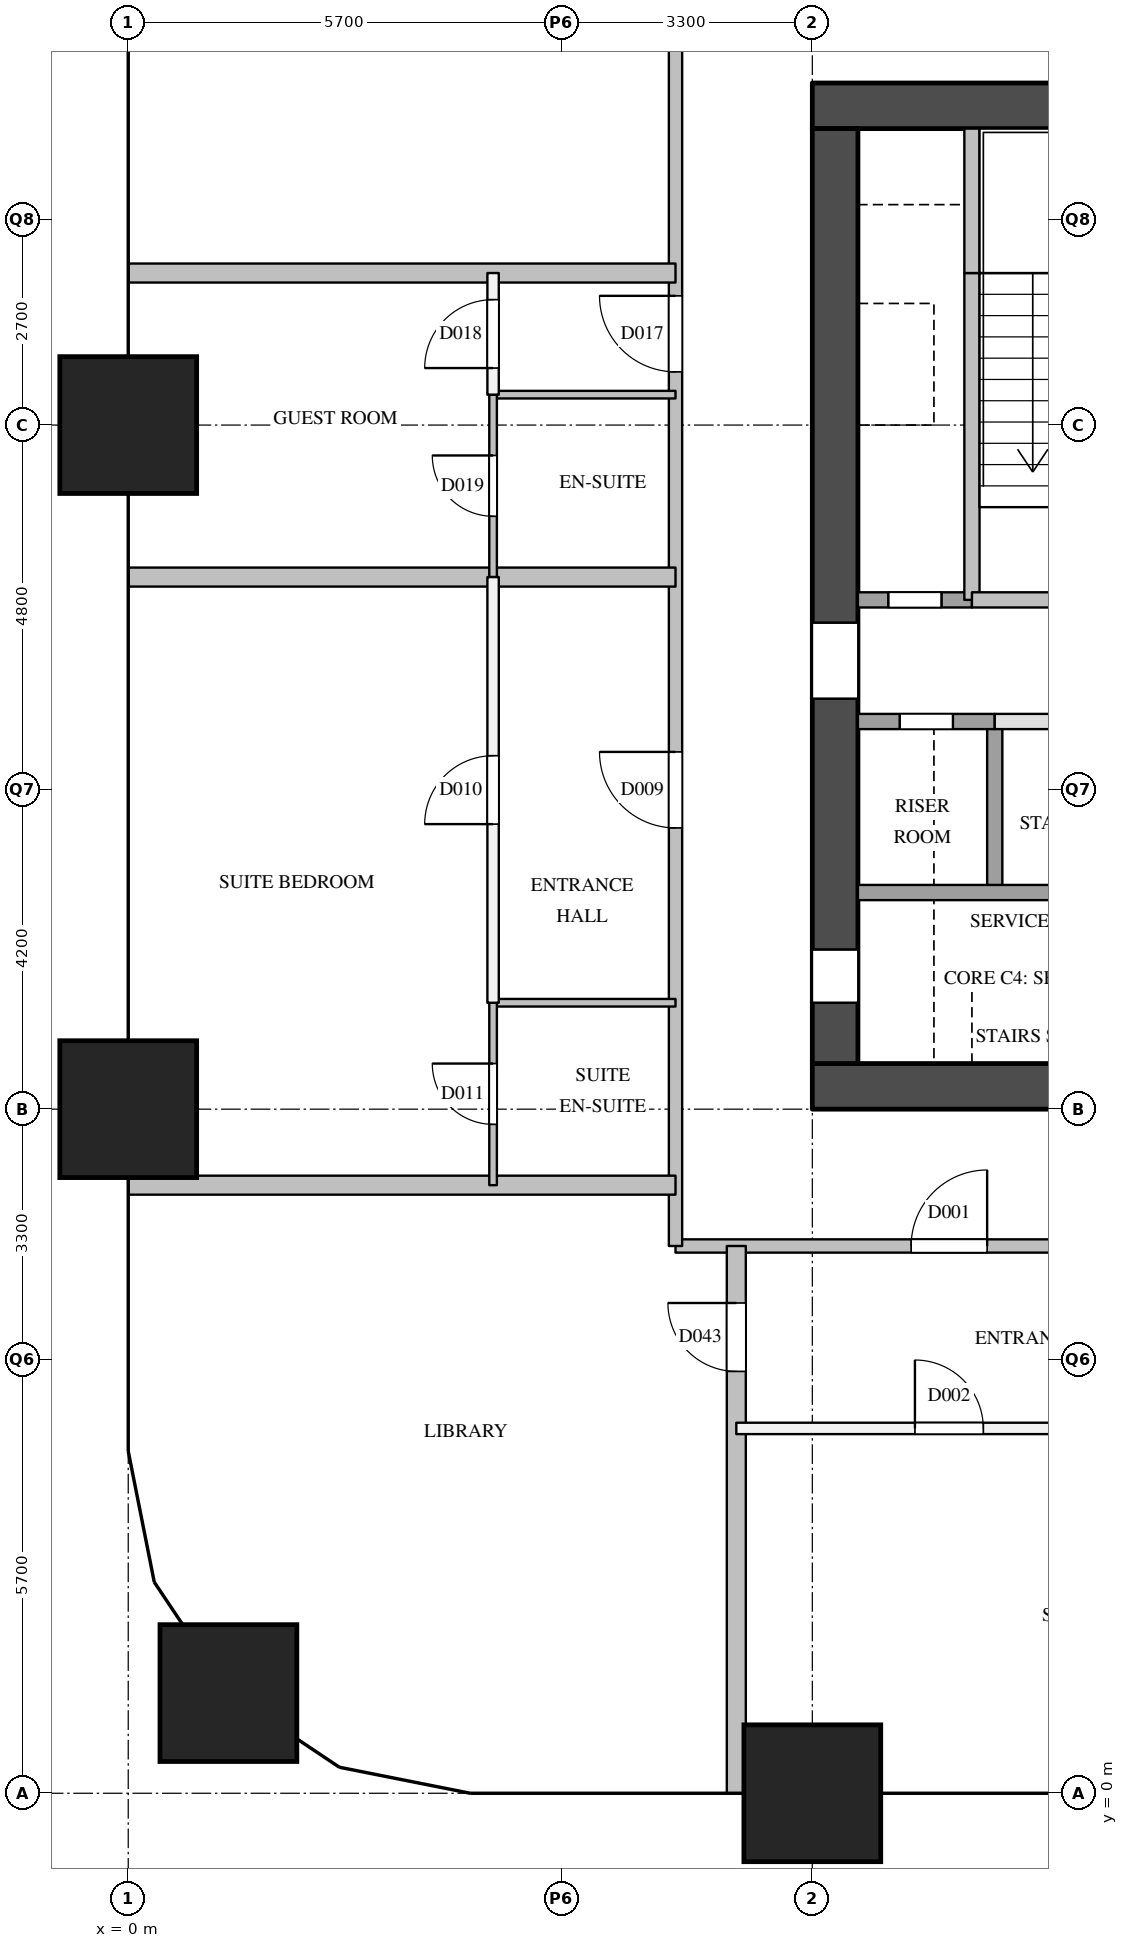
"""IFC4 building model, lengths in metres.
Left out: names, types, materials, properties, quantities, classifications, styles, units other than length and angle.
Written with IfcOpenShell. Run it as: python <this file> out.ifc"""

import sys

from ifc_helpers import new_model, si_unit, direction, frame, frame_2d, origin, origin_2d, place, context, subcontext, project, spatial, rectangle, extrude, element, fill, save


model = new_model("IFC4")
c1 = context("Model", 3, precision=1e-05, world=origin(), true_north=direction((0.0, 1.0)))
c2 = subcontext(c1, "Body", "Model", "MODEL_VIEW")
j1 = project(units=[si_unit("LENGTHUNIT", "METRE"), si_unit("PLANEANGLEUNIT", "RADIAN")], contexts=[c1])
p1 = place(None, origin())
s1 = spatial("IfcSite", under=j1, at=p1, CompositionType="ELEMENT")
p2 = place(p1, origin())
s2 = spatial("IfcBuilding", under=s1, at=p2, CompositionType="ELEMENT")
p3 = place(p2, frame((0.0, 0.0, 34.8)))
s3 = spatial("IfcBuildingStorey", under=s2, at=p3, CompositionType="ELEMENT", Elevation=34.8)
for number, where, z_axis, x_axis in (
    (1, (1.318, 1.318, 0.0), (0.0, 0.0, 1.0), (1.0, 0.0, 0.0)),
    (2, (0.0, 9.0, 0.0), (0.0, 0.0, 1.0), (1.0, 0.0, 0.0)),
    (3, (0.0, 18.0, 0.0), (0.0, 0.0, 1.0), (1.0, 0.0, 0.0)),
    (4, (9.0, 0.0, 0.0), (0.0, 0.0, 1.0), (1.0, 0.0, 0.0)),
):
    element("IfcColumn", number, at=place(p3, frame(where, z_axis=z_axis, x_axis=x_axis)), inside=s3, PredefinedType="COLUMN", context=c2, shape_type="SweptSolid", body=[
        extrude(rectangle(XDim=1.8, YDim=1.8, at=origin_2d()), origin(), (0.0, 0.0, 1.0), 3.8),
    ])
for number, where, z_axis, x_axis in (
    (5, (9.0, 9.3, 0.0), (0.0, 0.0, 1.0), (1.0, 0.0, 0.0)),
    (6, (9.0, 22.2, 0.0), (0.0, 0.0, 1.0), (1.0, 0.0, 0.0)),
):
    element("IfcWall", number, at=place(p3, frame(where, z_axis=z_axis, x_axis=x_axis)), inside=s3, PredefinedType="SHEAR", context=c2, shape_type="SweptSolid", body=[
        extrude(rectangle(XDim=9.0, YDim=0.6, at=frame_2d((4.5, 0.0))), origin(), (0.0, 0.0, 1.0), 3.5),
    ])
p4 = place(p3, frame((9.3, 9.6, 0.0), z_axis=(0.0, 0.0, 1.0), x_axis=(0.0, 1.0, 0.0)))
e7 = element("IfcWall", 7, at=p4, inside=s3, PredefinedType="SHEAR", context=c2, shape_type="SweptSolid", body=[
    extrude(rectangle(XDim=12.3, YDim=0.6, at=frame_2d((6.15, 0.0))), origin(), (0.0, 0.0, 1.0), 3.5),
])
p5 = place(p4, frame((0.8, 0.0, 0.0)))
e8 = element("IfcOpeningElement", 8, at=p5, cuts=e7, PredefinedType="OPENING", context=c2, shape_type="SweptSolid", body=[
    extrude(rectangle(XDim=0.7, YDim=2.1, at=frame_2d((0.35, 1.05))), frame((0.0, 0.31, 0.0), z_axis=(0.0, -1.0, 0.0), x_axis=(1.0, 0.0, 0.0)), (0.0, 0.0, 1.0), 0.62),
])
p6 = place(p4, frame((4.8, 0.0, 0.0)))
e9 = element("IfcOpeningElement", 9, at=p6, cuts=e7, PredefinedType="OPENING", context=c2, shape_type="SweptSolid", body=[
    extrude(rectangle(XDim=1.0, YDim=2.1, at=frame_2d((0.5, 1.05))), frame((0.0, 0.31, 0.0), z_axis=(0.0, -1.0, 0.0), x_axis=(1.0, 0.0, 0.0)), (0.0, 0.0, 1.0), 0.62),
])
p7 = place(p3, frame((11.1, 15.7, 0.0), z_axis=(0.0, 0.0, 1.0), x_axis=(0.0, 1.0, 0.0)))
e10 = element("IfcWall", 10, at=p7, inside=s3, PredefinedType="SOLIDWALL", context=c2, shape_type="SweptSolid", body=[
    extrude(rectangle(XDim=4.3, YDim=0.2, at=frame_2d((2.15, 0.0))), origin(), (0.0, 0.0, 1.0), 3.5),
])
p8 = place(p3, frame((11.1, 20.0, 0.0), z_axis=(0.0, 0.0, 1.0), x_axis=(0.0, 1.0, 0.0)))
e11 = element("IfcWall", 11, at=p8, inside=s3, PredefinedType="SOLIDWALL", context=c2, shape_type="SweptSolid", body=[
    extrude(rectangle(XDim=1.9, YDim=0.2, at=frame_2d((0.95, 0.0))), origin(), (0.0, 0.0, 1.0), 3.5),
])
p9 = place(p3, frame((11.4, 11.9, 0.0), z_axis=(0.0, 0.0, 1.0), x_axis=(0.0, 1.0, 0.0)))
e12 = element("IfcWall", 12, at=p9, inside=s3, PredefinedType="SOLIDWALL", context=c2, shape_type="SweptSolid", body=[
    extrude(rectangle(XDim=2.2, YDim=0.2, at=frame_2d((1.1, 0.0))), origin(), (0.0, 0.0, 1.0), 3.5),
])
p10 = place(p3, frame((9.6, 11.85, 0.0), z_axis=(0.0, 0.0, 1.0), x_axis=(1.0, 0.0, 0.0)))
e13 = element("IfcWall", 13, at=p10, inside=s3, PredefinedType="SOLIDWALL", context=c2, shape_type="SweptSolid", body=[
    extrude(rectangle(XDim=7.8, YDim=0.2, at=frame_2d((3.9, 0.0))), origin(), (0.0, 0.0, 1.0), 3.5),
])
p11 = place(p3, frame((11.4, 14.1, 0.0), z_axis=(0.0, 0.0, 1.0), x_axis=(1.0, 0.0, 0.0)))
e14 = element("IfcWall", 14, at=p11, inside=s3, PredefinedType="PARTITIONING", context=c2, shape_type="SweptSolid", body=[
    extrude(rectangle(XDim=6.0, YDim=0.2, at=frame_2d((3.0, 0.0))), origin(), (0.0, 0.0, 1.0), 3.5),
])
p12 = place(p11, frame((1.05, 0.0, 0.0)))
e15 = element("IfcOpeningElement", 15, at=p12, cuts=e14, PredefinedType="OPENING", context=c2, shape_type="SweptSolid", body=[
    extrude(rectangle(XDim=0.9, YDim=2.1, at=frame_2d((0.45, 1.05))), frame((0.0, 0.11, 0.0), z_axis=(0.0, -1.0, 0.0), x_axis=(1.0, 0.0, 0.0)), (0.0, 0.0, 1.0), 0.22),
])
p13 = place(p11, frame((4.05, 0.0, 0.0)))
e16 = element("IfcOpeningElement", 16, at=p13, cuts=e14, PredefinedType="OPENING", context=c2, shape_type="SweptSolid", body=[
    extrude(rectangle(XDim=0.9, YDim=2.1, at=frame_2d((0.45, 1.05))), frame((0.0, 0.11, 0.0), z_axis=(0.0, -1.0, 0.0), x_axis=(1.0, 0.0, 0.0)), (0.0, 0.0, 1.0), 0.22),
])
p14 = place(p3, frame((9.6, 14.1, 0.0), z_axis=(0.0, 0.0, 1.0), x_axis=(1.0, 0.0, 0.0)))
e17 = element("IfcWall", 17, at=p14, inside=s3, PredefinedType="SOLIDWALL", context=c2, shape_type="SweptSolid", body=[
    extrude(rectangle(XDim=1.8, YDim=0.2, at=frame_2d((0.9, 0.0))), origin(), (0.0, 0.0, 1.0), 3.5),
])
p15 = place(p14, frame((0.55, 0.0, 0.0)))
e18 = element("IfcOpeningElement", 18, at=p15, cuts=e17, PredefinedType="OPENING", context=c2, shape_type="SweptSolid", body=[
    extrude(rectangle(XDim=0.7, YDim=2.1, at=frame_2d((0.35, 1.05))), frame((0.0, 0.11, 0.0), z_axis=(0.0, -1.0, 0.0), x_axis=(1.0, 0.0, 0.0)), (0.0, 0.0, 1.0), 0.22),
])
p16 = place(p3, frame((9.6, 15.7, 0.0), z_axis=(0.0, 0.0, 1.0), x_axis=(1.0, 0.0, 0.0)))
e19 = element("IfcWall", 19, at=p16, inside=s3, PredefinedType="SOLIDWALL", context=c2, shape_type="SweptSolid", body=[
    extrude(rectangle(XDim=1.5, YDim=0.2, at=frame_2d((0.75, 0.0))), origin(), (0.0, 0.0, 1.0), 3.5),
])
p17 = place(p16, frame((0.4, 0.0, 0.0)))
e20 = element("IfcOpeningElement", 20, at=p17, cuts=e19, PredefinedType="OPENING", context=c2, shape_type="SweptSolid", body=[
    extrude(rectangle(XDim=0.7, YDim=2.1, at=frame_2d((0.35, 1.05))), frame((0.0, 0.11, 0.0), z_axis=(0.0, -1.0, 0.0), x_axis=(1.0, 0.0, 0.0)), (0.0, 0.0, 1.0), 0.22),
])
p18 = place(p3, frame((11.1, 15.7, 0.0), z_axis=(0.0, 0.0, 1.0), x_axis=(1.0, 0.0, 0.0)))
e21 = element("IfcWall", 21, at=p18, inside=s3, PredefinedType="SOLIDWALL", context=c2, shape_type="SweptSolid", body=[
    extrude(rectangle(XDim=6.3, YDim=0.2, at=frame_2d((3.15, 0.0))), origin(), (0.0, 0.0, 1.0), 3.5),
])
p19 = place(p18, frame((4.175, 0.0, 0.0)))
e22 = element("IfcOpeningElement", 22, at=p19, cuts=e21, PredefinedType="OPENING", context=c2, shape_type="SweptSolid", body=[
    extrude(rectangle(XDim=1.1, YDim=2.1, at=frame_2d((0.55, 1.05))), frame((0.0, 0.11, 0.0), z_axis=(0.0, -1.0, 0.0), x_axis=(1.0, 0.0, 0.0)), (0.0, 0.0, 1.0), 0.22),
])
p20 = place(p18, frame((1.025, 0.0, 0.0)))
e23 = element("IfcOpeningElement", 23, at=p20, cuts=e21, PredefinedType="OPENING", context=c2, shape_type="SweptSolid", body=[
    extrude(rectangle(XDim=1.1, YDim=2.1, at=frame_2d((0.55, 1.05))), frame((0.0, 0.11, 0.0), z_axis=(0.0, -1.0, 0.0), x_axis=(1.0, 0.0, 0.0)), (0.0, 0.0, 1.0), 0.22),
])
p21 = place(p3, frame((7.2, 7.2, 0.0), z_axis=(0.0, 0.0, 1.0), x_axis=(1.0, 0.0, 0.0)))
e24 = element("IfcWall", 24, at=p21, inside=s3, PredefinedType="PARTITIONING", context=c2, shape_type="SweptSolid", body=[
    extrude(rectangle(XDim=12.6, YDim=0.175, at=frame_2d((6.3, 0.0))), origin(), (0.0, 0.0, 1.0), 3.5),
])
p22 = place(p21, frame((3.1, 0.0, 0.0)))
e25 = element("IfcOpeningElement", 25, at=p22, cuts=e24, PredefinedType="OPENING", context=c2, shape_type="SweptSolid", body=[
    extrude(rectangle(XDim=1.0, YDim=2.1, at=frame_2d((0.5, 1.05))), frame((0.0, 0.097, 0.0), z_axis=(0.0, -1.0, 0.0), x_axis=(1.0, 0.0, 0.0)), (0.0, 0.0, 1.0), 0.195),
])
p23 = place(p21, frame((10.25, 0.0, 0.0)))
e26 = element("IfcOpeningElement", 26, at=p23, cuts=e24, PredefinedType="OPENING", context=c2, shape_type="SweptSolid", body=[
    extrude(rectangle(XDim=0.9, YDim=2.1, at=frame_2d((0.45, 1.05))), frame((0.0, 0.097, 0.0), z_axis=(0.0, -1.0, 0.0), x_axis=(1.0, 0.0, 0.0)), (0.0, 0.0, 1.0), 0.195),
])
p24 = place(p3, frame((7.2, 7.2, 0.0), z_axis=(0.0, 0.0, 1.0), x_axis=(0.0, 1.0, 0.0)))
e27 = element("IfcWall", 27, at=p24, inside=s3, PredefinedType="PARTITIONING", context=c2, shape_type="SweptSolid", body=[
    extrude(rectangle(XDim=16.49, YDim=0.175, at=frame_2d((8.245, 0.0))), origin(), (0.0, 0.0, 1.0), 3.5),
])
p25 = place(p24, frame((5.5, 0.0, 0.0)))
e28 = element("IfcOpeningElement", 28, at=p25, cuts=e27, PredefinedType="OPENING", context=c2, shape_type="SweptSolid", body=[
    extrude(rectangle(XDim=1.0, YDim=2.1, at=frame_2d((0.5, 1.05))), frame((0.0, 0.097, 0.0), z_axis=(0.0, -1.0, 0.0), x_axis=(1.0, 0.0, 0.0)), (0.0, 0.0, 1.0), 0.195),
])
p26 = place(p24, frame((11.5, 0.0, 0.0)))
e29 = element("IfcOpeningElement", 29, at=p26, cuts=e27, PredefinedType="OPENING", context=c2, shape_type="SweptSolid", body=[
    extrude(rectangle(XDim=1.0, YDim=2.1, at=frame_2d((0.5, 1.05))), frame((0.0, 0.097, 0.0), z_axis=(0.0, -1.0, 0.0), x_axis=(1.0, 0.0, 0.0)), (0.0, 0.0, 1.0), 0.195),
])
p27 = place(p3, frame((8.0, 4.8, 0.0), z_axis=(0.0, 0.0, 1.0), x_axis=(1.0, 0.0, 0.0)))
e30 = element("IfcWall", 30, at=p27, inside=s3, PredefinedType="PARTITIONING", context=c2, shape_type="SweptSolid", body=[
    extrude(rectangle(XDim=5.6, YDim=0.15, at=frame_2d((2.8, 0.0))), origin(), (0.0, 0.0, 1.0), 3.5),
])
p28 = place(p27, frame((2.35, 0.0, 0.0)))
e31 = element("IfcOpeningElement", 31, at=p28, cuts=e30, PredefinedType="OPENING", context=c2, shape_type="SweptSolid", body=[
    extrude(rectangle(XDim=0.9, YDim=2.1, at=frame_2d((0.45, 1.05))), frame((0.0, 0.085, 0.0), z_axis=(0.0, -1.0, 0.0), x_axis=(1.0, 0.0, 0.0)), (0.0, 0.0, 1.0), 0.17),
])
p29 = place(p3, frame((4.8, 10.4, 0.0), z_axis=(0.0, 0.0, 1.0), x_axis=(0.0, 1.0, 0.0)))
e32 = element("IfcWall", 32, at=p29, inside=s3, PredefinedType="PARTITIONING", context=c2, shape_type="SweptSolid", body=[
    extrude(rectangle(XDim=5.6, YDim=0.15, at=frame_2d((2.8, 0.0))), origin(), (0.0, 0.0, 1.0), 3.5),
])
p30 = place(p29, frame((2.35, 0.0, 0.0)))
e33 = element("IfcOpeningElement", 33, at=p30, cuts=e32, PredefinedType="OPENING", context=c2, shape_type="SweptSolid", body=[
    extrude(rectangle(XDim=0.9, YDim=2.1, at=frame_2d((0.45, 1.05))), frame((0.0, 0.085, 0.0), z_axis=(0.0, -1.0, 0.0), x_axis=(1.0, 0.0, 0.0)), (0.0, 0.0, 1.0), 0.17),
])
p31 = place(p3, frame((4.8, 18.4, 0.0), z_axis=(0.0, 0.0, 1.0), x_axis=(0.0, 1.0, 0.0)))
e34 = element("IfcWall", 34, at=p31, inside=s3, PredefinedType="PARTITIONING", context=c2, shape_type="SweptSolid", body=[
    extrude(rectangle(XDim=1.6, YDim=0.15, at=frame_2d((0.8, 0.0))), origin(), (0.0, 0.0, 1.0), 3.5),
])
p32 = place(p31, frame((0.35, 0.0, 0.0)))
e35 = element("IfcOpeningElement", 35, at=p32, cuts=e34, PredefinedType="OPENING", context=c2, shape_type="SweptSolid", body=[
    extrude(rectangle(XDim=0.9, YDim=2.1, at=frame_2d((0.45, 1.05))), frame((0.0, 0.085, 0.0), z_axis=(0.0, -1.0, 0.0), x_axis=(1.0, 0.0, 0.0)), (0.0, 0.0, 1.0), 0.17),
])
for number, where, z_axis, x_axis in (
    (36, (0.0, 8.0, 0.0), (0.0, 0.0, 1.0), (1.0, 0.0, 0.0)),
    (37, (0.0, 16.0, 0.0), (0.0, 0.0, 1.0), (1.0, 0.0, 0.0)),
    (38, (0.0, 20.0, 0.0), (0.0, 0.0, 1.0), (1.0, 0.0, 0.0)),
):
    element("IfcWall", number, at=place(p3, frame(where, z_axis=z_axis, x_axis=x_axis)), inside=s3, PredefinedType="PARTITIONING", context=c2, shape_type="SweptSolid", body=[
        extrude(rectangle(XDim=7.2, YDim=0.25, at=frame_2d((3.6, 0.0))), origin(), (0.0, 0.0, 1.0), 2.5),
    ])
p33 = place(p3, frame((8.0, 0.0, 0.0), z_axis=(0.0, 0.0, 1.0), x_axis=(0.0, 1.0, 0.0)))
e39 = element("IfcWall", 39, at=p33, inside=s3, PredefinedType="PARTITIONING", context=c2, shape_type="SweptSolid", body=[
    extrude(rectangle(XDim=7.2, YDim=0.25, at=frame_2d((3.6, 0.0))), origin(), (0.0, 0.0, 1.0), 2.5),
])
p34 = place(p33, frame((5.55, 0.0, 0.0)))
e40 = element("IfcOpeningElement", 40, at=p34, cuts=e39, PredefinedType="OPENING", context=c2, shape_type="SweptSolid", body=[
    extrude(rectangle(XDim=0.9, YDim=2.1, at=frame_2d((0.45, 1.05))), frame((0.0, 0.135, 0.0), z_axis=(0.0, -1.0, 0.0), x_axis=(1.0, 0.0, 0.0)), (0.0, 0.0, 1.0), 0.27),
])
for number, where, z_axis, x_axis in (
    (41, (4.8, 10.4, 0.0), (0.0, 0.0, 1.0), (1.0, 0.0, 0.0)),
    (42, (4.8, 18.4, 0.0), (0.0, 0.0, 1.0), (1.0, 0.0, 0.0)),
):
    element("IfcWall", number, at=place(p3, frame(where, z_axis=z_axis, x_axis=x_axis)), inside=s3, PredefinedType="PARTITIONING", context=c2, shape_type="SweptSolid", body=[
        extrude(rectangle(XDim=2.4, YDim=0.1, at=frame_2d((1.2, 0.0))), origin(), (0.0, 0.0, 1.0), 3.5),
    ])
p35 = place(p3, frame((4.8, 8.0, 0.0), z_axis=(0.0, 0.0, 1.0), x_axis=(0.0, 1.0, 0.0)))
e43 = element("IfcWall", 43, at=p35, inside=s3, PredefinedType="PARTITIONING", context=c2, shape_type="SweptSolid", body=[
    extrude(rectangle(XDim=2.4, YDim=0.1, at=frame_2d((1.2, 0.0))), origin(), (0.0, 0.0, 1.0), 3.5),
])
p36 = place(p35, frame((0.8, 0.0, 0.0)))
e44 = element("IfcOpeningElement", 44, at=p36, cuts=e43, PredefinedType="OPENING", context=c2, shape_type="SweptSolid", body=[
    extrude(rectangle(XDim=0.8, YDim=2.1, at=frame_2d((0.4, 1.05))), frame((0.0, 0.06, 0.0), z_axis=(0.0, -1.0, 0.0), x_axis=(1.0, 0.0, 0.0)), (0.0, 0.0, 1.0), 0.12),
])
p37 = place(p3, frame((4.8, 16.0, 0.0), z_axis=(0.0, 0.0, 1.0), x_axis=(0.0, 1.0, 0.0)))
e45 = element("IfcWall", 45, at=p37, inside=s3, PredefinedType="PARTITIONING", context=c2, shape_type="SweptSolid", body=[
    extrude(rectangle(XDim=2.4, YDim=0.1, at=frame_2d((1.2, 0.0))), origin(), (0.0, 0.0, 1.0), 3.5),
])
p38 = place(p37, frame((0.8, 0.0, 0.0)))
e46 = element("IfcOpeningElement", 46, at=p38, cuts=e45, PredefinedType="OPENING", context=c2, shape_type="SweptSolid", body=[
    extrude(rectangle(XDim=0.8, YDim=2.1, at=frame_2d((0.4, 1.05))), frame((0.0, 0.06, 0.0), z_axis=(0.0, -1.0, 0.0), x_axis=(1.0, 0.0, 0.0)), (0.0, 0.0, 1.0), 0.12),
])
p39 = place(p17, origin())
e47 = element("IfcDoor", 47, at=p39, inside=s3, OperationType="SINGLE_SWING_LEFT", PredefinedType="DOOR", context=c2, shape_type="SweptSolid", body=[
    extrude(rectangle(XDim=0.7, YDim=2.1, at=frame_2d((0.35, 1.05))), frame((0.0, 0.025, 0.0), z_axis=(0.0, -1.0, 0.0), x_axis=(1.0, 0.0, 0.0)), (0.0, 0.0, 1.0), 0.05),
])
fill(e20, e47)
p40 = place(p15, origin())
e48 = element("IfcDoor", 48, at=p40, inside=s3, OperationType="SINGLE_SWING_LEFT", PredefinedType="DOOR", context=c2, shape_type="SweptSolid", body=[
    extrude(rectangle(XDim=0.7, YDim=2.1, at=frame_2d((0.35, 1.05))), frame((0.0, 0.025, 0.0), z_axis=(0.0, -1.0, 0.0), x_axis=(1.0, 0.0, 0.0)), (0.0, 0.0, 1.0), 0.05),
])
fill(e18, e48)
p41 = place(p5, origin())
e49 = element("IfcDoor", 49, at=p41, inside=s3, OperationType="SINGLE_SWING_LEFT", PredefinedType="DOOR", context=c2, shape_type="SweptSolid", body=[
    extrude(rectangle(XDim=0.7, YDim=2.1, at=frame_2d((0.35, 1.05))), frame((0.0, 0.025, 0.0), z_axis=(0.0, -1.0, 0.0), x_axis=(1.0, 0.0, 0.0)), (0.0, 0.0, 1.0), 0.05),
])
fill(e8, e49)
p42 = place(p6, origin())
e50 = element("IfcDoor", 50, at=p42, inside=s3, OperationType="SINGLE_SWING_LEFT", PredefinedType="DOOR", context=c2, shape_type="SweptSolid", body=[
    extrude(rectangle(XDim=1.0, YDim=2.1, at=frame_2d((0.5, 1.05))), frame((0.0, 0.025, 0.0), z_axis=(0.0, -1.0, 0.0), x_axis=(1.0, 0.0, 0.0)), (0.0, 0.0, 1.0), 0.05),
])
fill(e9, e50)
p43 = place(p22, origin())
e51 = element("IfcDoor", 51, at=p43, inside=s3, OperationType="SINGLE_SWING_RIGHT", PredefinedType="DOOR", context=c2, shape_type="SweptSolid", body=[
    extrude(rectangle(XDim=1.0, YDim=2.1, at=frame_2d((0.5, 1.05))), frame((0.0, 0.025, 0.0), z_axis=(0.0, -1.0, 0.0), x_axis=(1.0, 0.0, 0.0)), (0.0, 0.0, 1.0), 0.05),
])
fill(e25, e51)
p44 = place(p28, origin())
e52 = element("IfcDoor", 52, at=p44, inside=s3, OperationType="SINGLE_SWING_LEFT", PredefinedType="DOOR", context=c2, shape_type="SweptSolid", body=[
    extrude(rectangle(XDim=0.9, YDim=2.1, at=frame_2d((0.45, 1.05))), frame((0.0, 0.025, 0.0), z_axis=(0.0, -1.0, 0.0), x_axis=(1.0, 0.0, 0.0)), (0.0, 0.0, 1.0), 0.05),
])
fill(e31, e52)
p45 = place(p25, origin())
e53 = element("IfcDoor", 53, at=p45, inside=s3, OperationType="SINGLE_SWING_RIGHT", PredefinedType="DOOR", context=c2, shape_type="SweptSolid", body=[
    extrude(rectangle(XDim=1.0, YDim=2.1, at=frame_2d((0.5, 1.05))), frame((0.0, 0.025, 0.0), z_axis=(0.0, -1.0, 0.0), x_axis=(1.0, 0.0, 0.0)), (0.0, 0.0, 1.0), 0.05),
])
fill(e28, e53)
p46 = place(p30, origin())
e54 = element("IfcDoor", 54, at=p46, inside=s3, OperationType="SINGLE_SWING_LEFT", PredefinedType="DOOR", context=c2, shape_type="SweptSolid", body=[
    extrude(rectangle(XDim=0.9, YDim=2.1, at=frame_2d((0.45, 1.05))), frame((0.0, 0.025, 0.0), z_axis=(0.0, -1.0, 0.0), x_axis=(1.0, 0.0, 0.0)), (0.0, 0.0, 1.0), 0.05),
])
fill(e33, e54)
p47 = place(p36, origin())
e55 = element("IfcDoor", 55, at=p47, inside=s3, OperationType="SINGLE_SWING_RIGHT", PredefinedType="DOOR", context=c2, shape_type="SweptSolid", body=[
    extrude(rectangle(XDim=0.8, YDim=2.1, at=frame_2d((0.4, 1.05))), frame((0.0, 0.025, 0.0), z_axis=(0.0, -1.0, 0.0), x_axis=(1.0, 0.0, 0.0)), (0.0, 0.0, 1.0), 0.05),
])
fill(e44, e55)
p48 = place(p26, origin())
e56 = element("IfcDoor", 56, at=p48, inside=s3, OperationType="SINGLE_SWING_RIGHT", PredefinedType="DOOR", context=c2, shape_type="SweptSolid", body=[
    extrude(rectangle(XDim=1.0, YDim=2.1, at=frame_2d((0.5, 1.05))), frame((0.0, 0.025, 0.0), z_axis=(0.0, -1.0, 0.0), x_axis=(1.0, 0.0, 0.0)), (0.0, 0.0, 1.0), 0.05),
])
fill(e29, e56)
p49 = place(p32, origin())
e57 = element("IfcDoor", 57, at=p49, inside=s3, OperationType="SINGLE_SWING_LEFT", PredefinedType="DOOR", context=c2, shape_type="SweptSolid", body=[
    extrude(rectangle(XDim=0.9, YDim=2.1, at=frame_2d((0.45, 1.05))), frame((0.0, 0.025, 0.0), z_axis=(0.0, -1.0, 0.0), x_axis=(1.0, 0.0, 0.0)), (0.0, 0.0, 1.0), 0.05),
])
fill(e35, e57)
p50 = place(p38, origin())
e58 = element("IfcDoor", 58, at=p50, inside=s3, OperationType="SINGLE_SWING_RIGHT", PredefinedType="DOOR", context=c2, shape_type="SweptSolid", body=[
    extrude(rectangle(XDim=0.8, YDim=2.1, at=frame_2d((0.4, 1.05))), frame((0.0, 0.025, 0.0), z_axis=(0.0, -1.0, 0.0), x_axis=(1.0, 0.0, 0.0)), (0.0, 0.0, 1.0), 0.05),
])
fill(e46, e58)
p51 = place(p34, origin())
e59 = element("IfcDoor", 59, at=p51, inside=s3, OperationType="SINGLE_SWING_RIGHT", PredefinedType="DOOR", context=c2, shape_type="SweptSolid", body=[
    extrude(rectangle(XDim=0.9, YDim=2.1, at=frame_2d((0.45, 1.05))), frame((0.0, 0.025, 0.0), z_axis=(0.0, -1.0, 0.0), x_axis=(1.0, 0.0, 0.0)), (0.0, 0.0, 1.0), 0.05),
])
fill(e40, e59)
save(model, sys.argv[1])
